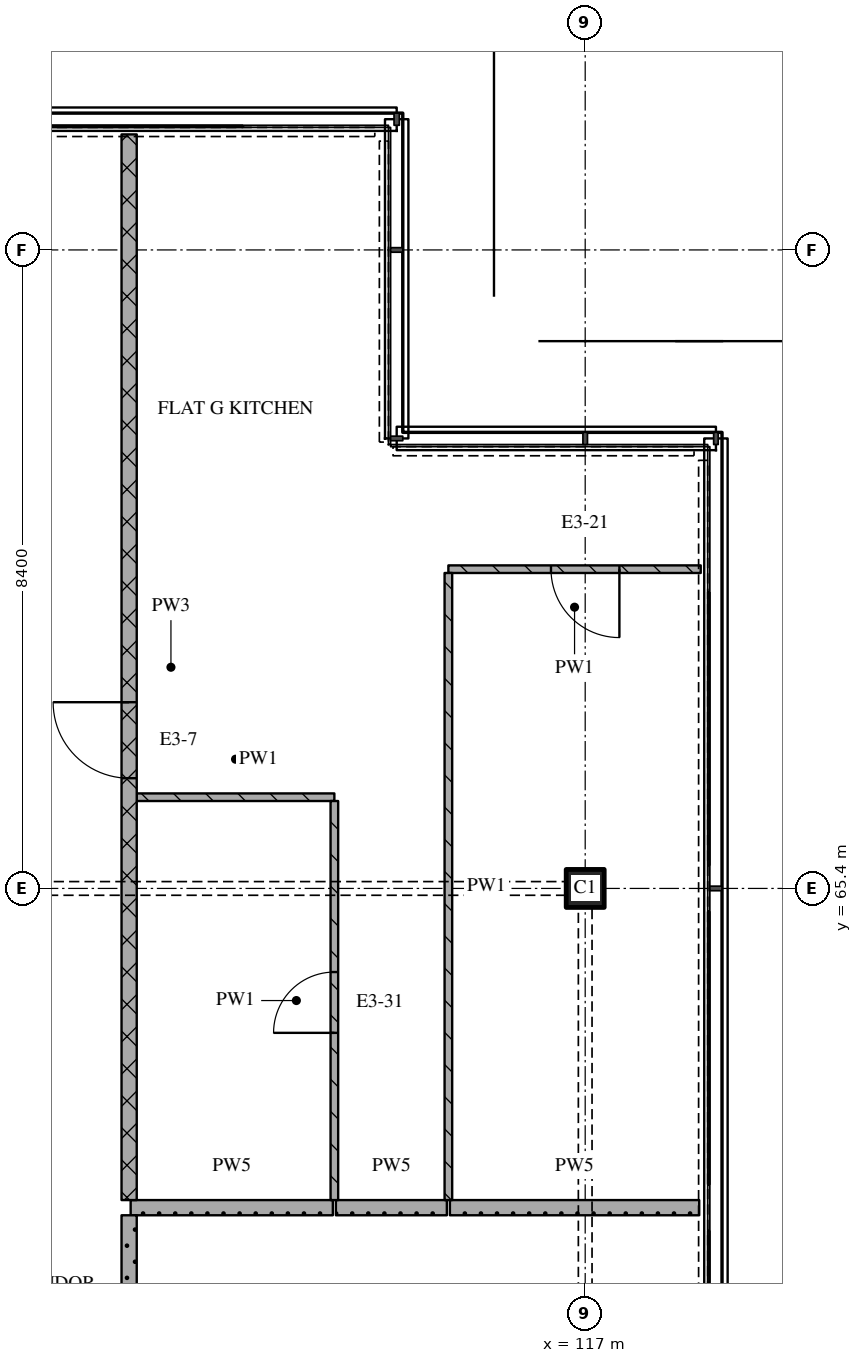
"""IFC4 building model, lengths in metres.
Left out: names, types, materials, properties, quantities, classifications, styles, units other than length and angle.
Written with IfcOpenShell. Run it as: python <this file> out.ifc"""

import sys

from ifc_helpers import new_model, si_unit, direction, frame, frame_2d, origin, origin_2d, place, context, subcontext, project, spatial, rectangle, extrude, element, fill, save


model = new_model("IFC4")
c1 = context("Model", 3, precision=1e-05, world=origin(), true_north=direction((0.0, 1.0)))
c2 = subcontext(c1, "Body", "Model", "MODEL_VIEW")
j1 = project(units=[si_unit("LENGTHUNIT", "METRE"), si_unit("PLANEANGLEUNIT", "RADIAN")], contexts=[c1])
p1 = place(None, origin())
s1 = spatial("IfcSite", under=j1, at=p1, CompositionType="ELEMENT")
p2 = place(p1, origin())
s2 = spatial("IfcBuilding", under=s1, at=p2, CompositionType="ELEMENT")
p3 = place(p2, frame((0.0, 0.0, 274.35)))
s3 = spatial("IfcBuildingStorey", under=s2, at=p3, CompositionType="ELEMENT", Elevation=274.35)
p4 = place(p3, frame((117.0, 65.4, 0.0), z_axis=(0.0, 0.0, 1.0), x_axis=(1.0, 0.0, 0.0)))
e1 = element("IfcColumn", 1, at=p4, inside=s3, PredefinedType="COLUMN", context=c2, shape_type="SweptSolid", body=[
    extrude(rectangle(XDim=0.5, YDim=0.5, at=origin_2d()), origin(), (0.0, 0.0, 1.0), 3.6),
])
p5 = place(p3, frame((111.02, 61.2, 0.0), z_axis=(0.0, 0.0, 1.0), x_axis=(1.0, 0.0, 0.0)))
e2 = element("IfcWall", 2, at=p5, inside=s3, PredefinedType="PARTITIONING", context=c2, shape_type="SweptSolid", body=[
    extrude(rectangle(XDim=2.66, YDim=0.2, at=frame_2d((1.33, 0.0))), origin(), (0.0, 0.0, 1.0), 3.32),
])
p6 = place(p3, frame((113.72, 61.2, 0.0), z_axis=(0.0, 0.0, 1.0), x_axis=(1.0, 0.0, 0.0)))
e3 = element("IfcWall", 3, at=p6, inside=s3, PredefinedType="PARTITIONING", context=c2, shape_type="SweptSolid", body=[
    extrude(rectangle(XDim=1.46, YDim=0.2, at=frame_2d((0.73, 0.0))), origin(), (0.0, 0.0, 1.0), 3.32),
])
p7 = place(p3, frame((115.22, 61.2, 0.0), z_axis=(0.0, 0.0, 1.0), x_axis=(1.0, 0.0, 0.0)))
e4 = element("IfcWall", 4, at=p7, inside=s3, PredefinedType="PARTITIONING", context=c2, shape_type="SweptSolid", body=[
    extrude(rectangle(XDim=3.28, YDim=0.2, at=frame_2d((1.64, 0.0))), origin(), (0.0, 0.0, 1.0), 3.32),
])
p8 = place(p3, frame((111.1, 66.6, 0.0), z_axis=(0.0, 0.0, 1.0), x_axis=(1.0, 0.0, 0.0)))
e5 = element("IfcWall", 5, at=p8, inside=s3, PredefinedType="PARTITIONING", context=c2, shape_type="SweptSolid", body=[
    extrude(rectangle(XDim=2.6, YDim=0.1, at=frame_2d((1.3, 0.0))), origin(), (0.0, 0.0, 1.0), 3.32),
])
p9 = place(p3, frame((118.52, 69.6, 0.0), z_axis=(0.0, 0.0, 1.0), x_axis=(-1.0, 0.0, 0.0)))
e6 = element("IfcWall", 6, at=p9, inside=s3, PredefinedType="PARTITIONING", context=c2, shape_type="SweptSolid", body=[
    extrude(rectangle(XDim=3.32, YDim=0.1, at=frame_2d((1.66, 0.0))), origin(), (0.0, 0.0, 1.0), 3.32),
])
p10 = place(p9, frame((1.07, 0.0, 0.0)))
e7 = element("IfcOpeningElement", 7, at=p10, cuts=e6, PredefinedType="OPENING", context=c2, shape_type="SweptSolid", body=[
    extrude(rectangle(XDim=0.9, YDim=2.1, at=frame_2d((0.45, 1.05))), frame((0.0, 0.06, 0.0), z_axis=(0.0, -1.0, 0.0), x_axis=(1.0, 0.0, 0.0)), (0.0, 0.0, 1.0), 0.12),
])
p11 = place(p3, frame((111.0, 75.32, 0.0), z_axis=(0.0, 0.0, 1.0), x_axis=(0.0, -1.0, 0.0)))
e8 = element("IfcWall", 8, at=p11, inside=s3, PredefinedType="PARTITIONING", context=c2, shape_type="SweptSolid", body=[
    extrude(rectangle(XDim=14.02, YDim=0.2, at=frame_2d((7.01, 0.0))), origin(), (0.0, 0.0, 1.0), 3.32),
])
p12 = place(p11, frame((7.47, 0.0, 0.0)))
e9 = element("IfcOpeningElement", 9, at=p12, cuts=e8, PredefinedType="OPENING", context=c2, shape_type="SweptSolid", body=[
    extrude(rectangle(XDim=1.0, YDim=2.1, at=frame_2d((0.5, 1.05))), frame((0.0, 0.11, 0.0), z_axis=(0.0, -1.0, 0.0), x_axis=(1.0, 0.0, 0.0)), (0.0, 0.0, 1.0), 0.22),
])
p13 = place(p3, frame((111.0, 61.1, 0.0), z_axis=(0.0, 0.0, 1.0), x_axis=(0.0, -1.0, 0.0)))
e10 = element("IfcWall", 10, at=p13, inside=s3, PredefinedType="PARTITIONING", context=c2, shape_type="SweptSolid", body=[
    extrude(rectangle(XDim=2.2, YDim=0.2, at=frame_2d((1.1, 0.0))), origin(), (0.0, 0.0, 1.0), 3.32),
])
p14 = place(p3, frame((113.7, 61.3, 0.0), z_axis=(0.0, 0.0, 1.0), x_axis=(0.0, 1.0, 0.0)))
e11 = element("IfcWall", 11, at=p14, inside=s3, PredefinedType="PARTITIONING", context=c2, shape_type="SweptSolid", body=[
    extrude(rectangle(XDim=5.25, YDim=0.1, at=frame_2d((2.625, 0.0))), origin(), (0.0, 0.0, 1.0), 3.32),
])
p15 = place(p14, frame((2.2, 0.0, 0.0)))
e12 = element("IfcOpeningElement", 12, at=p15, cuts=e11, PredefinedType="OPENING", context=c2, shape_type="SweptSolid", body=[
    extrude(rectangle(XDim=0.8, YDim=2.1, at=frame_2d((0.4, 1.05))), frame((0.0, 0.06, 0.0), z_axis=(0.0, -1.0, 0.0), x_axis=(1.0, 0.0, 0.0)), (0.0, 0.0, 1.0), 0.12),
])
p16 = place(p3, frame((115.2, 69.55, 0.0), z_axis=(0.0, 0.0, 1.0), x_axis=(0.0, -1.0, 0.0)))
e13 = element("IfcWall", 13, at=p16, inside=s3, PredefinedType="PARTITIONING", context=c2, shape_type="SweptSolid", body=[
    extrude(rectangle(XDim=8.25, YDim=0.1, at=frame_2d((4.125, 0.0))), origin(), (0.0, 0.0, 1.0), 3.32),
])
p17 = place(p10, origin())
e14 = element("IfcDoor", 14, at=p17, inside=s3, OperationType="SINGLE_SWING_LEFT", PredefinedType="DOOR", context=c2, shape_type="SweptSolid", body=[
    extrude(rectangle(XDim=0.9, YDim=2.1, at=frame_2d((0.45, 1.05))), frame((0.0, 0.025, 0.0), z_axis=(0.0, -1.0, 0.0), x_axis=(1.0, 0.0, 0.0)), (0.0, 0.0, 1.0), 0.05),
])
fill(e7, e14)
p18 = place(p12, origin())
e15 = element("IfcDoor", 15, at=p18, inside=s3, OperationType="SINGLE_SWING_RIGHT", PredefinedType="DOOR", context=c2, shape_type="SweptSolid", body=[
    extrude(rectangle(XDim=1.0, YDim=2.1, at=frame_2d((0.5, 1.05))), frame((0.0, 0.025, 0.0), z_axis=(0.0, -1.0, 0.0), x_axis=(1.0, 0.0, 0.0)), (0.0, 0.0, 1.0), 0.05),
])
fill(e9, e15)
p19 = place(p15, origin())
e16 = element("IfcDoor", 16, at=p19, inside=s3, OperationType="SINGLE_SWING_LEFT", PredefinedType="DOOR", context=c2, shape_type="SweptSolid", body=[
    extrude(rectangle(XDim=0.8, YDim=2.1, at=frame_2d((0.4, 1.05))), frame((0.0, 0.025, 0.0), z_axis=(0.0, -1.0, 0.0), x_axis=(1.0, 0.0, 0.0)), (0.0, 0.0, 1.0), 0.05),
])
fill(e12, e16)
save(model, sys.argv[1])
